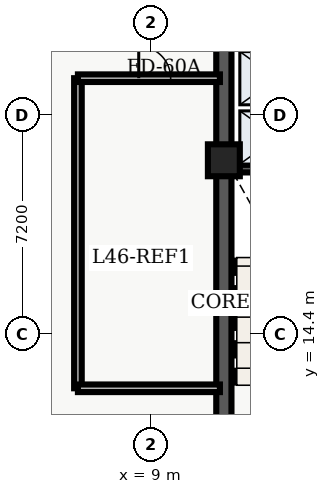
"""IFC4 building model, lengths in metres.
Left out: names, types, materials, properties, quantities, classifications, styles, units other than length and angle.
Written with IfcOpenShell. Run it as: python <this file> out.ifc"""

import sys

from ifc_helpers import new_model, entity, si_unit, converted_unit, direction, frame, origin_with_axes, origin_2d_with_axis, place, context, subcontext, project, spatial, polyline, rectangle, outline, extrude, element, fill, save


model = new_model("IFC4")
c1 = context("Model", 3, precision=1e-05, world=origin_with_axes(), true_north=direction((0.0, 1.0)))
c2 = subcontext(c1, "Body", "Model", "MODEL_VIEW")
j1 = project(units=[si_unit("LENGTHUNIT", "METRE"), converted_unit("PLANEANGLEUNIT", "DEGREE", entity("IfcPlaneAngleMeasure", 0.017), si_unit("PLANEANGLEUNIT", "RADIAN"), dimensions=[0, 0, 0, 0, 0, 0, 0])], contexts=[c1])
p1 = place(None, origin_with_axes())
s1 = spatial("IfcSite", under=j1, at=p1, CompositionType="ELEMENT")
p2 = place(p1, origin_with_axes())
s2 = spatial("IfcBuilding", under=s1, at=p2, CompositionType="ELEMENT")
p3 = place(p2, frame((0.0, 0.0, 187.5), z_axis=(0.0, 0.0, 1.0), x_axis=(1.0, 0.0, 0.0)))
s3 = spatial("IfcBuildingStorey", under=s2, at=p3, CompositionType="ELEMENT", Elevation=187.5)
p4 = place(p3, frame((11.4, 10.8, 0.0), z_axis=(0.0, 0.0, 1.0), x_axis=(0.0, 1.0, 0.0)))
e1 = element("IfcWall", 1, at=p4, inside=s3, PredefinedType="SHEAR", context=c2, shape_type="SweptSolid", body=[
    extrude(outline(polyline([(0.0, -0.25), (27.0, -0.25), (27.0, 0.25), (0.0, 0.25), (0.0, -0.25)])), origin_with_axes(), (0.0, 0.0, 1.0), 4.86),
])
p5 = place(p3, frame((11.65, 19.825, 0.0), z_axis=(0.0, 0.0, 1.0), x_axis=(1.0, 0.0, 0.0)))
e2 = element("IfcWall", 2, at=p5, inside=s3, PredefinedType="SHEAR", context=c2, shape_type="SweptSolid", body=[
    extrude(outline(polyline([(0.0, -0.125), (6.7, -0.125), (6.7, 0.125), (0.0, 0.125), (0.0, -0.125)])), origin_with_axes(), (0.0, 0.0, 1.0), 4.86),
])
p6 = place(p3, frame((11.4, 20.1, 0.0), z_axis=(0.0, 0.0, 1.0), x_axis=(1.0, 0.0, 0.0)))
e3 = element("IfcColumn", 3, at=p6, inside=s3, PredefinedType="COLUMN", context=c2, shape_type="SweptSolid", body=[
    extrude(rectangle(XDim=1.05, YDim=1.05, at=origin_2d_with_axis()), origin_with_axes(), (0.0, 0.0, 1.0), 5.1),
])
p7 = place(p3, frame((6.6, 12.6, 0.0), z_axis=(0.0, 0.0, 1.0), x_axis=(0.0, 1.0, 0.0)))
e4 = element("IfcWall", 4, at=p7, inside=s3, PredefinedType="SOLIDWALL", context=c2, shape_type="SweptSolid", body=[
    extrude(outline(polyline([(0.0, -0.125), (10.2, -0.125), (10.2, 0.125), (0.0, 0.125), (0.0, -0.125)])), origin_with_axes(), (0.0, 0.0, 1.0), 3.2),
])
p8 = place(p3, frame((6.6, 12.6, 0.0), z_axis=(0.0, 0.0, 1.0), x_axis=(1.0, 0.0, 0.0)))
e5 = element("IfcWall", 5, at=p8, inside=s3, PredefinedType="SOLIDWALL", context=c2, shape_type="SweptSolid", body=[
    extrude(outline(polyline([(0.0, -0.125), (4.67, -0.125), (4.67, 0.125), (0.0, 0.125), (0.0, -0.125)])), origin_with_axes(), (0.0, 0.0, 1.0), 3.2),
])
p9 = place(p3, frame((6.6, 22.8, 0.0), z_axis=(0.0, 0.0, 1.0), x_axis=(1.0, 0.0, 0.0)))
e6 = element("IfcWall", 6, at=p9, inside=s3, PredefinedType="SOLIDWALL", context=c2, shape_type="SweptSolid", body=[
    extrude(outline(polyline([(0.0, -0.125), (4.67, -0.125), (4.67, 0.125), (0.0, 0.125), (0.0, -0.125)])), origin_with_axes(), (0.0, 0.0, 1.0), 3.2),
])
p10 = place(p9, frame((2.525, 0.0, 0.0), z_axis=(0.0, 0.0, 1.0), x_axis=(1.0, 0.0, 0.0)))
e7 = element("IfcOpeningElement", 7, at=p10, cuts=e6, PredefinedType="OPENING", context=c2, shape_type="SweptSolid", body=[
    extrude(rectangle(XDim=1.05, YDim=0.27, at=origin_2d_with_axis()), origin_with_axes(), (0.0, 0.0, 1.0), 2.15),
])
p11 = place(p9, frame((2.525, 0.0, 0.0), z_axis=(0.0, 0.0, 1.0), x_axis=(1.0, 0.0, 0.0)))
e8 = element("IfcDoor", 8, at=p11, inside=s3, OperationType="SINGLE_SWING_LEFT", PredefinedType="DOOR", context=c2, shape_type="SweptSolid", body=[
    extrude(rectangle(XDim=1.05, YDim=0.09, at=origin_2d_with_axis()), origin_with_axes(), (0.0, 0.0, 1.0), 2.15),
])
fill(e7, e8)
save(model, sys.argv[1])
